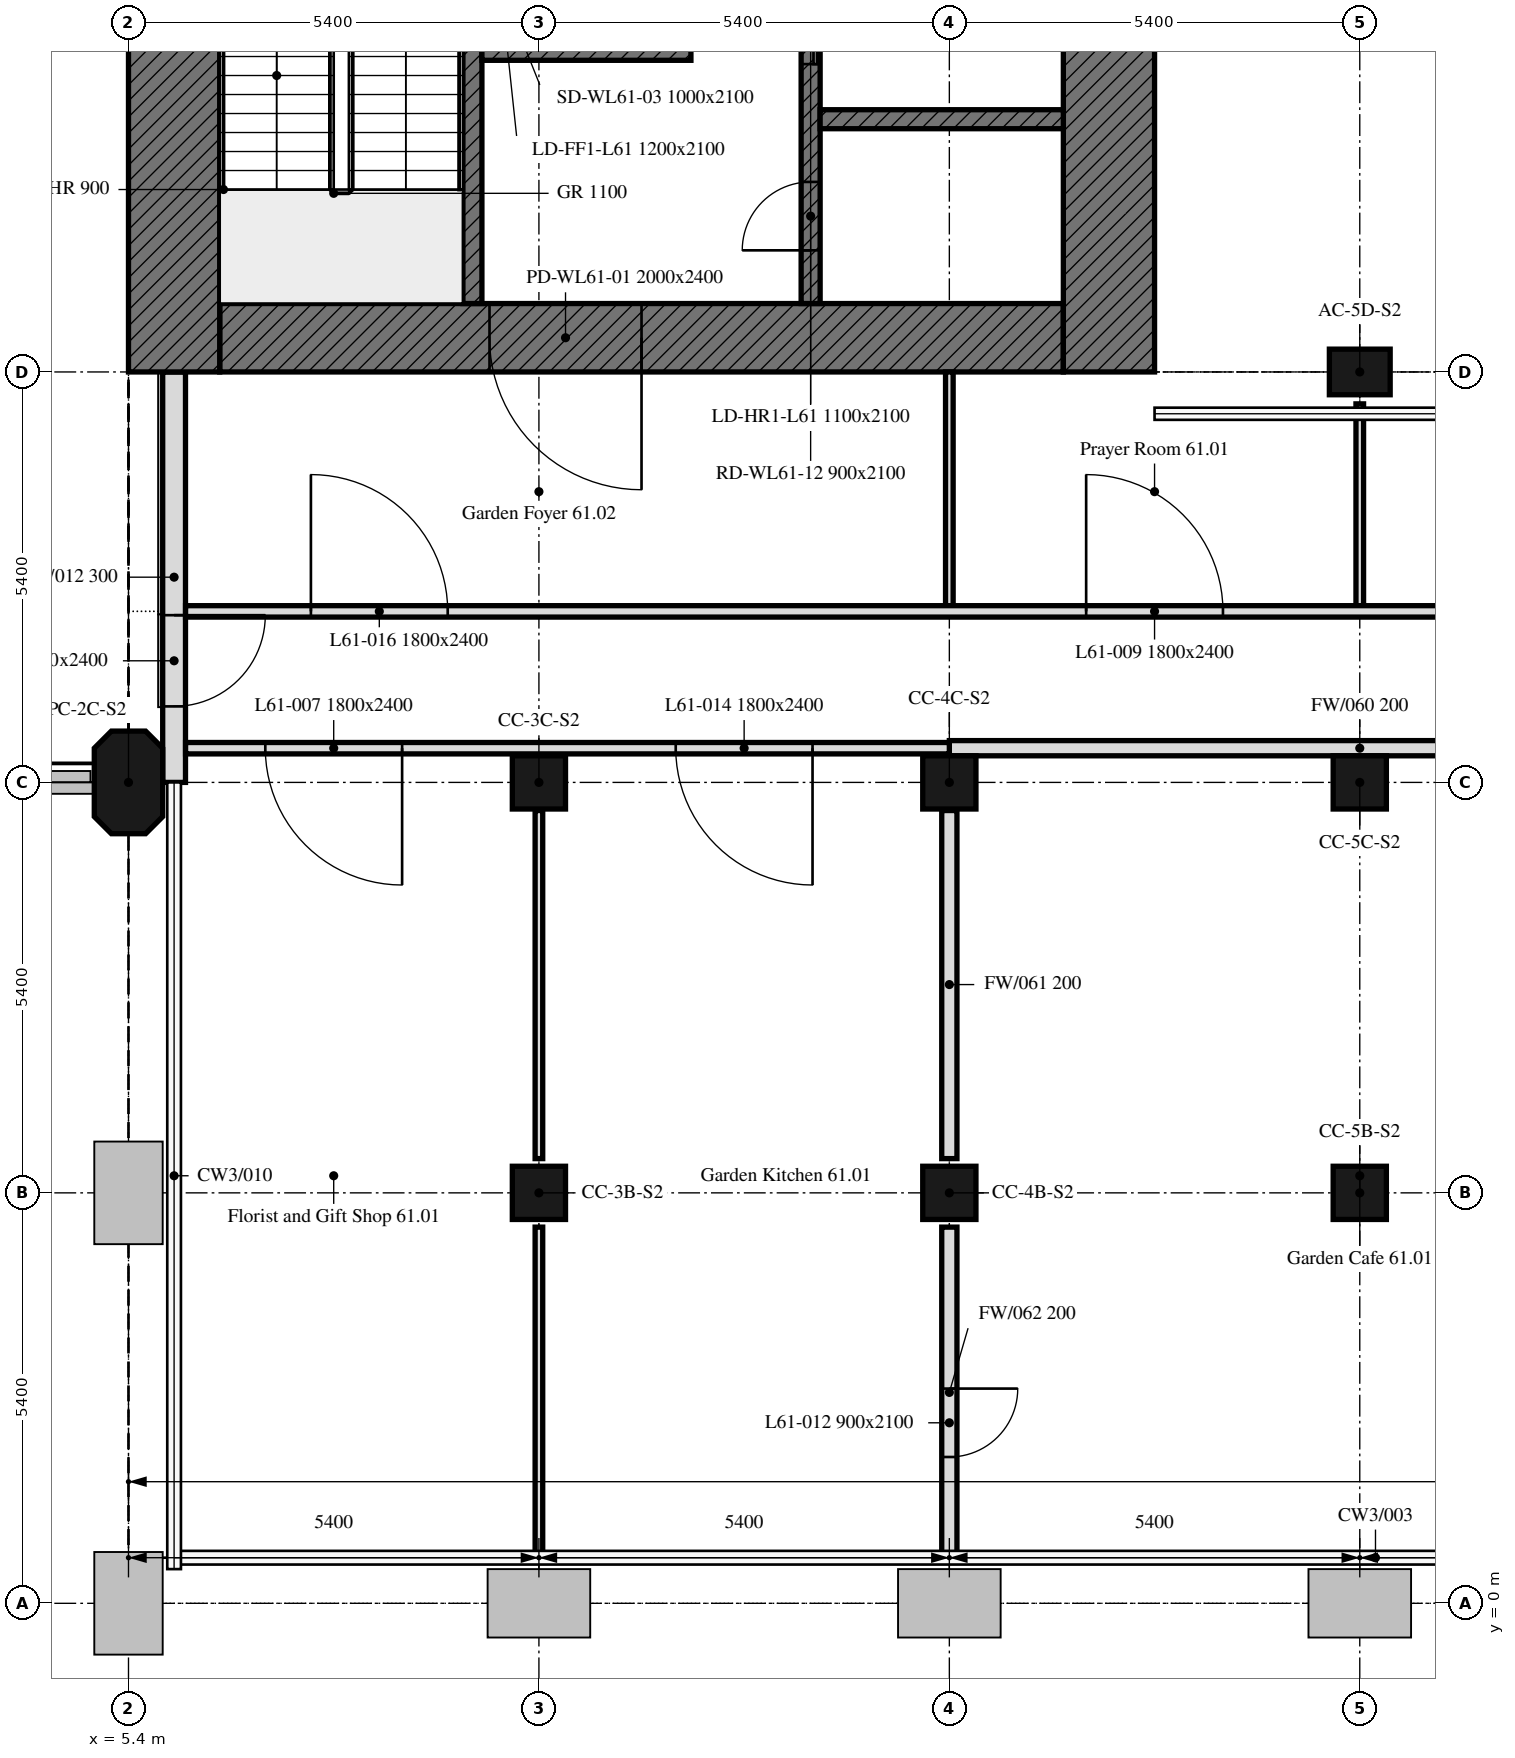
"""IFC4 building model, lengths in metres.
Left out: names, types, materials, properties, quantities, classifications, styles, units other than length and angle.
Written with IfcOpenShell. Run it as: python <this file> out.ifc"""

import sys

from ifc_helpers import new_model, si_unit, direction, frame, frame_2d, origin, origin_2d, place, context, subcontext, project, spatial, polyline, rectangle, outline, extrude, element, fill, save


model = new_model("IFC4")
c1 = context("Model", 3, precision=1e-05, world=origin(), true_north=direction((0.0, 1.0)))
c2 = subcontext(c1, "Body", "Model", "MODEL_VIEW")
j1 = project(units=[si_unit("LENGTHUNIT", "METRE"), si_unit("PLANEANGLEUNIT", "RADIAN")], contexts=[c1])
p1 = place(None, origin())
s1 = spatial("IfcSite", under=j1, at=p1, CompositionType="ELEMENT")
p2 = place(p1, origin())
s2 = spatial("IfcBuilding", under=s1, at=p2, CompositionType="ELEMENT")
p3 = place(p2, frame((0.0, 0.0, 250.9)))
s3 = spatial("IfcBuildingStorey", under=s2, at=p3, CompositionType="ELEMENT", Elevation=250.9)
for number, where, z_axis, x_axis in (
    (1, (10.8, 5.4, 0.0), (0.0, 0.0, 1.0), (1.0, 0.0, 0.0)),
    (2, (16.2, 5.4, 0.0), (0.0, 0.0, 1.0), (1.0, 0.0, 0.0)),
    (3, (21.6, 5.4, 0.0), (0.0, 0.0, 1.0), (1.0, 0.0, 0.0)),
):
    element("IfcColumn", number, at=place(p3, frame(where, z_axis=z_axis, x_axis=x_axis)), inside=s3, PredefinedType="COLUMN", context=c2, shape_type="SweptSolid", body=[
        extrude(rectangle(XDim=0.7, YDim=0.7, at=origin_2d()), origin(), (0.0, 0.0, 1.0), 4.5),
    ])
p4 = place(p3, frame((5.4, 10.8, 0.0), z_axis=(0.0, 0.0, 1.0), x_axis=(0.0, 1.0, 0.0)))
e4 = element("IfcColumn", 4, at=p4, inside=s3, PredefinedType="COLUMN", context=c2, shape_type="SweptSolid", body=[
    extrude(outline(polyline([(-0.45, -0.45), (0.45, -0.45), (0.675, -0.225), (0.675, 0.225), (0.45, 0.45), (-0.45, 0.45), (-0.675, 0.225), (-0.675, -0.225), (-0.45, -0.45)])), origin(), (0.0, 0.0, 1.0), 4.5),
])
for number, where, z_axis, x_axis in (
    (5, (10.8, 10.8, 0.0), (0.0, 0.0, 1.0), (1.0, 0.0, 0.0)),
    (6, (16.2, 10.8, 0.0), (0.0, 0.0, 1.0), (1.0, 0.0, 0.0)),
    (7, (21.6, 10.8, 0.0), (0.0, 0.0, 1.0), (1.0, 0.0, 0.0)),
):
    element("IfcColumn", number, at=place(p3, frame(where, z_axis=z_axis, x_axis=x_axis)), inside=s3, PredefinedType="COLUMN", context=c2, shape_type="SweptSolid", body=[
        extrude(rectangle(XDim=0.7, YDim=0.7, at=origin_2d()), origin(), (0.0, 0.0, 1.0), 4.5),
    ])
p5 = place(p3, frame((21.6, 16.2, 0.0), z_axis=(0.0, 0.0, 1.0), x_axis=(1.0, 0.0, 0.0)))
e8 = element("IfcColumn", 8, at=p5, inside=s3, PredefinedType="COLUMN", context=c2, shape_type="SweptSolid", body=[
    extrude(rectangle(XDim=0.8, YDim=0.6, at=origin_2d()), origin(), (0.0, 0.0, 1.0), 4.5),
])
p6 = place(p3, frame((6.0, 16.2, 0.0), z_axis=(0.0, 0.0, 1.0), x_axis=(0.0, -1.0, 0.0)))
e9 = element("IfcWall", 9, at=p6, inside=s3, PredefinedType="SOLIDWALL", context=c2, shape_type="SweptSolid", body=[
    extrude(rectangle(XDim=5.4, YDim=0.3, at=frame_2d((2.7, 0.0))), origin(), (0.0, 0.0, 1.0), 4.5),
])
p7 = place(p6, frame((3.2, 0.0, 0.0)))
e10 = element("IfcOpeningElement", 10, at=p7, cuts=e9, PredefinedType="OPENING", context=c2, shape_type="SweptSolid", body=[
    extrude(rectangle(XDim=1.2, YDim=2.4, at=frame_2d((0.6, 1.2))), frame((0.0, 0.16, 0.0), z_axis=(0.0, -1.0, 0.0), x_axis=(1.0, 0.0, 0.0)), (0.0, 0.0, 1.0), 0.32),
])
p8 = place(p3, frame((17.7, 16.65, 0.0), z_axis=(0.0, 0.0, 1.0), x_axis=(-1.0, 0.0, 0.0)))
e11 = element("IfcWall", 11, at=p8, inside=s3, PredefinedType="SOLIDWALL", context=c2, shape_type="SweptSolid", body=[
    extrude(rectangle(XDim=11.1, YDim=0.9, at=frame_2d((5.55, 0.0))), origin(), (0.0, 0.0, 1.0), 4.5),
])
p9 = place(p8, frame((5.55, 0.0, 0.0)))
e12 = element("IfcOpeningElement", 12, at=p9, cuts=e11, PredefinedType="OPENING", context=c2, shape_type="SweptSolid", body=[
    extrude(rectangle(XDim=2.0, YDim=2.4, at=frame_2d((1.0, 1.2))), frame((0.0, 0.45, 0.0), z_axis=(0.0, -1.0, 0.0), x_axis=(1.0, 0.0, 0.0)), (0.0, 0.0, 1.0), 0.9),
])
for number, where, z_axis, x_axis in (
    (13, (6.0, 16.2, 0.0), (0.0, 0.0, 1.0), (0.0, 1.0, 0.0)),
    (14, (18.3, 32.4, 0.0), (0.0, 0.0, 1.0), (0.0, -1.0, 0.0)),
):
    element("IfcWall", number, at=place(p3, frame(where, z_axis=z_axis, x_axis=x_axis)), inside=s3, PredefinedType="SOLIDWALL", context=c2, shape_type="SweptSolid", body=[
        extrude(rectangle(XDim=16.2, YDim=1.2, at=frame_2d((8.1, 0.0))), origin(), (0.0, 0.0, 1.0), 4.5),
    ])
p10 = place(p3, frame((9.925, 17.1, 0.0), z_axis=(0.0, 0.0, 1.0), x_axis=(0.0, 1.0, 0.0)))
e15 = element("IfcWall", 15, at=p10, inside=s3, PredefinedType="SOLIDWALL", context=c2, shape_type="SweptSolid", body=[
    extrude(rectangle(XDim=14.4, YDim=0.25, at=frame_2d((7.2, 0.0))), origin(), (0.0, 0.0, 1.0), 4.5),
])
p11 = place(p10, frame((4.6, 0.0, 0.0)))
e16 = element("IfcOpeningElement", 16, at=p11, cuts=e15, PredefinedType="OPENING", context=c2, shape_type="SweptSolid", body=[
    extrude(rectangle(XDim=1.0, YDim=2.1, at=frame_2d((0.5, 1.05))), frame((0.0, 0.125, 0.0), z_axis=(0.0, -1.0, 0.0), x_axis=(1.0, 0.0, 0.0)), (0.0, 0.0, 1.0), 0.25),
])
p12 = place(p10, frame((7.062, 0.0, 0.0)))
e17 = element("IfcOpeningElement", 17, at=p12, cuts=e15, PredefinedType="OPENING", context=c2, shape_type="SweptSolid", body=[
    extrude(rectangle(XDim=1.2, YDim=2.1, at=frame_2d((0.6, 1.05))), frame((0.0, 0.125, 0.0), z_axis=(0.0, -1.0, 0.0), x_axis=(1.0, 0.0, 0.0)), (0.0, 0.0, 1.0), 0.25),
])
p13 = place(p10, frame((9.726, 0.0, 0.0)))
e18 = element("IfcOpeningElement", 18, at=p13, cuts=e15, PredefinedType="OPENING", context=c2, shape_type="SweptSolid", body=[
    extrude(rectangle(XDim=0.9, YDim=2.1, at=frame_2d((0.45, 1.05))), frame((0.0, 0.125, 0.0), z_axis=(0.0, -1.0, 0.0), x_axis=(1.0, 0.0, 0.0)), (0.0, 0.0, 1.0), 0.25),
])
p14 = place(p10, frame((11.539, 0.0, 0.0)))
e19 = element("IfcOpeningElement", 19, at=p14, cuts=e15, PredefinedType="OPENING", context=c2, shape_type="SweptSolid", body=[
    extrude(rectangle(XDim=0.9, YDim=2.1, at=frame_2d((0.45, 1.05))), frame((0.0, 0.125, 0.0), z_axis=(0.0, -1.0, 0.0), x_axis=(1.0, 0.0, 0.0)), (0.0, 0.0, 1.0), 0.25),
])
p15 = place(p10, frame((13.226, 0.0, 0.0)))
e20 = element("IfcOpeningElement", 20, at=p15, cuts=e15, PredefinedType="OPENING", context=c2, shape_type="SweptSolid", body=[
    extrude(rectangle(XDim=0.9, YDim=2.1, at=frame_2d((0.45, 1.05))), frame((0.0, 0.125, 0.0), z_axis=(0.0, -1.0, 0.0), x_axis=(1.0, 0.0, 0.0)), (0.0, 0.0, 1.0), 0.25),
])
p16 = place(p3, frame((14.375, 17.1, 0.0), z_axis=(0.0, 0.0, 1.0), x_axis=(0.0, 1.0, 0.0)))
e21 = element("IfcWall", 21, at=p16, inside=s3, PredefinedType="SOLIDWALL", context=c2, shape_type="SweptSolid", body=[
    extrude(rectangle(XDim=14.4, YDim=0.25, at=frame_2d((7.2, 0.0))), origin(), (0.0, 0.0, 1.0), 4.5),
])
p17 = place(p16, frame((13.15, 0.0, 0.0)))
e22 = element("IfcOpeningElement", 22, at=p17, cuts=e21, PredefinedType="OPENING", context=c2, shape_type="SweptSolid", body=[
    extrude(rectangle(XDim=1.0, YDim=2.1, at=frame_2d((0.5, 1.05))), frame((0.0, 0.125, 0.0), z_axis=(0.0, -1.0, 0.0), x_axis=(1.0, 0.0, 0.0)), (0.0, 0.0, 1.0), 0.25),
])
p18 = place(p16, frame((3.15, 0.0, 0.0)))
e23 = element("IfcOpeningElement", 23, at=p18, cuts=e21, PredefinedType="OPENING", context=c2, shape_type="SweptSolid", body=[
    extrude(rectangle(XDim=1.1, YDim=2.1, at=frame_2d((0.55, 1.05))), frame((0.0, 0.125, 0.0), z_axis=(0.0, -1.0, 0.0), x_axis=(1.0, 0.0, 0.0)), (0.0, 0.0, 1.0), 0.25),
])
p19 = place(p16, frame((0.7, 0.0, 0.0)))
e24 = element("IfcOpeningElement", 24, at=p19, cuts=e21, PredefinedType="OPENING", context=c2, shape_type="SweptSolid", body=[
    extrude(rectangle(XDim=0.9, YDim=2.1, at=frame_2d((0.45, 1.05))), frame((0.0, 0.125, 0.0), z_axis=(0.0, -1.0, 0.0), x_axis=(1.0, 0.0, 0.0)), (0.0, 0.0, 1.0), 0.25),
])
p20 = place(p16, frame((6.175, 0.0, 0.0)))
e25 = element("IfcOpeningElement", 25, at=p20, cuts=e21, PredefinedType="OPENING", context=c2, shape_type="SweptSolid", body=[
    extrude(rectangle(XDim=0.9, YDim=2.1, at=frame_2d((0.45, 1.05))), frame((0.0, 0.125, 0.0), z_axis=(0.0, -1.0, 0.0), x_axis=(1.0, 0.0, 0.0)), (0.0, 0.0, 1.0), 0.25),
])
p21 = place(p3, frame((10.05, 20.425, 0.0), z_axis=(0.0, 0.0, 1.0), x_axis=(1.0, 0.0, 0.0)))
e26 = element("IfcWall", 26, at=p21, inside=s3, PredefinedType="SOLIDWALL", context=c2, shape_type="SweptSolid", body=[
    extrude(rectangle(XDim=2.75, YDim=0.25, at=frame_2d((1.375, 0.0))), origin(), (0.0, 0.0, 1.0), 4.5),
])
p22 = place(p3, frame((14.5, 19.525, 0.0), z_axis=(0.0, 0.0, 1.0), x_axis=(1.0, 0.0, 0.0)))
e27 = element("IfcWall", 27, at=p22, inside=s3, PredefinedType="SOLIDWALL", context=c2, shape_type="SweptSolid", body=[
    extrude(rectangle(XDim=3.2, YDim=0.25, at=frame_2d((1.6, 0.0))), origin(), (0.0, 0.0, 1.0), 4.5),
])
p23 = place(p3, frame((27.0, 11.25, 0.0), z_axis=(0.0, 0.0, 1.0), x_axis=(-1.0, 0.0, 0.0)))
e28 = element("IfcWall", 28, at=p23, inside=s3, PredefinedType="PARTITIONING", context=c2, shape_type="SweptSolid", body=[
    extrude(rectangle(XDim=10.8, YDim=0.2, at=frame_2d((5.4, 0.0))), origin(), (0.0, 0.0, 1.0), 3.75),
])
p24 = place(p23, frame((1.7, 0.0, 0.0)))
e29 = element("IfcOpeningElement", 29, at=p24, cuts=e28, PredefinedType="OPENING", context=c2, shape_type="SweptSolid", body=[
    extrude(rectangle(XDim=1.8, YDim=2.4, at=frame_2d((0.9, 1.2))), frame((0.0, 0.1, 0.0), z_axis=(0.0, -1.0, 0.0), x_axis=(1.0, 0.0, 0.0)), (0.0, 0.0, 1.0), 0.2),
])
p25 = place(p3, frame((16.2, 10.43, 0.0), z_axis=(0.0, 0.0, 1.0), x_axis=(0.0, -1.0, 0.0)))
e30 = element("IfcWall", 30, at=p25, inside=s3, PredefinedType="PARTITIONING", context=c2, shape_type="SweptSolid", body=[
    extrude(rectangle(XDim=4.579, YDim=0.2, at=frame_2d((2.29, 0.0))), origin(), (0.0, 0.0, 1.0), 3.75),
])
p26 = place(p3, frame((16.2, 4.949, 0.0), z_axis=(0.0, 0.0, 1.0), x_axis=(0.0, -1.0, 0.0)))
e31 = element("IfcWall", 31, at=p26, inside=s3, PredefinedType="PARTITIONING", context=c2, shape_type="SweptSolid", body=[
    extrude(rectangle(XDim=4.349, YDim=0.2, at=frame_2d((2.175, 0.0))), origin(), (0.0, 0.0, 1.0), 3.75),
])
p27 = place(p26, frame((2.124, 0.0, 0.0)))
e32 = element("IfcOpeningElement", 32, at=p27, cuts=e31, PredefinedType="OPENING", context=c2, shape_type="SweptSolid", body=[
    extrude(rectangle(XDim=0.9, YDim=2.1, at=frame_2d((0.45, 1.05))), frame((0.0, 0.1, 0.0), z_axis=(0.0, -1.0, 0.0), x_axis=(1.0, 0.0, 0.0)), (0.0, 0.0, 1.0), 0.2),
])
p28 = place(p3, frame((10.8, 10.43, 0.0), z_axis=(0.0, 0.0, 1.0), x_axis=(0.0, -1.0, 0.0)))
e33 = element("IfcWall", 33, at=p28, inside=s3, PredefinedType="PARTITIONING", context=c2, shape_type="SweptSolid", body=[
    extrude(rectangle(XDim=4.579, YDim=0.1, at=frame_2d((2.29, 0.0))), origin(), (0.0, 0.0, 1.0), 3.75),
])
p29 = place(p3, frame((10.8, 4.949, 0.0), z_axis=(0.0, 0.0, 1.0), x_axis=(0.0, -1.0, 0.0)))
e34 = element("IfcWall", 34, at=p29, inside=s3, PredefinedType="PARTITIONING", context=c2, shape_type="SweptSolid", body=[
    extrude(rectangle(XDim=4.349, YDim=0.1, at=frame_2d((2.175, 0.0))), origin(), (0.0, 0.0, 1.0), 3.75),
])
p30 = place(p3, frame((16.2, 11.25, 0.0), z_axis=(0.0, 0.0, 1.0), x_axis=(-1.0, 0.0, 0.0)))
e35 = element("IfcWall", 35, at=p30, inside=s3, PredefinedType="PARTITIONING", context=c2, shape_type="SweptSolid", body=[
    extrude(rectangle(XDim=10.049, YDim=0.15, at=frame_2d((5.024, 0.0))), origin(), (0.0, 0.0, 1.0), 3.75),
])
p31 = place(p30, frame((7.2, 0.0, 0.0)))
e36 = element("IfcOpeningElement", 36, at=p31, cuts=e35, PredefinedType="OPENING", context=c2, shape_type="SweptSolid", body=[
    extrude(rectangle(XDim=1.8, YDim=2.4, at=frame_2d((0.9, 1.2))), frame((0.0, 0.075, 0.0), z_axis=(0.0, -1.0, 0.0), x_axis=(1.0, 0.0, 0.0)), (0.0, 0.0, 1.0), 0.15),
])
p32 = place(p30, frame((1.8, 0.0, 0.0)))
e37 = element("IfcOpeningElement", 37, at=p32, cuts=e35, PredefinedType="OPENING", context=c2, shape_type="SweptSolid", body=[
    extrude(rectangle(XDim=1.8, YDim=2.4, at=frame_2d((0.9, 1.2))), frame((0.0, 0.075, 0.0), z_axis=(0.0, -1.0, 0.0), x_axis=(1.0, 0.0, 0.0)), (0.0, 0.0, 1.0), 0.15),
])
p33 = place(p3, frame((21.6, 15.78, 0.0), z_axis=(0.0, 0.0, 1.0), x_axis=(0.0, -1.0, 0.0)))
e38 = element("IfcWall", 38, at=p33, inside=s3, PredefinedType="PARTITIONING", context=c2, shape_type="SweptSolid", body=[
    extrude(rectangle(XDim=2.655, YDim=0.1, at=frame_2d((1.328, 0.0))), origin(), (0.0, 0.0, 1.0), 3.75),
])
p34 = place(p3, frame((16.2, 16.2, 0.0), z_axis=(0.0, 0.0, 1.0), x_axis=(0.0, -1.0, 0.0)))
e39 = element("IfcWall", 39, at=p34, inside=s3, PredefinedType="PARTITIONING", context=c2, shape_type="SweptSolid", body=[
    extrude(rectangle(XDim=3.075, YDim=0.1, at=frame_2d((1.538, 0.0))), origin(), (0.0, 0.0, 1.0), 3.75),
])
p35 = place(p3, frame((6.151, 13.05, 0.0), z_axis=(0.0, 0.0, 1.0), x_axis=(1.0, 0.0, 0.0)))
e40 = element("IfcWall", 40, at=p35, inside=s3, PredefinedType="PARTITIONING", context=c2, shape_type="SweptSolid", body=[
    extrude(rectangle(XDim=36.449, YDim=0.15, at=frame_2d((18.225, 0.0))), origin(), (0.0, 0.0, 1.0), 3.75),
])
p36 = place(p35, frame((17.849, 0.0, 0.0)))
e41 = element("IfcOpeningElement", 41, at=p36, cuts=e40, PredefinedType="OPENING", context=c2, shape_type="SweptSolid", body=[
    extrude(rectangle(XDim=1.8, YDim=2.4, at=frame_2d((0.9, 1.2))), frame((0.0, 0.075, 0.0), z_axis=(0.0, -1.0, 0.0), x_axis=(1.0, 0.0, 0.0)), (0.0, 0.0, 1.0), 0.15),
])
p37 = place(p35, frame((11.849, 0.0, 0.0)))
e42 = element("IfcOpeningElement", 42, at=p37, cuts=e40, PredefinedType="OPENING", context=c2, shape_type="SweptSolid", body=[
    extrude(rectangle(XDim=1.8, YDim=2.4, at=frame_2d((0.9, 1.2))), frame((0.0, 0.075, 0.0), z_axis=(0.0, -1.0, 0.0), x_axis=(1.0, 0.0, 0.0)), (0.0, 0.0, 1.0), 0.15),
])
p38 = place(p35, frame((28.649, 0.0, 0.0)))
e43 = element("IfcOpeningElement", 43, at=p38, cuts=e40, PredefinedType="OPENING", context=c2, shape_type="SweptSolid", body=[
    extrude(rectangle(XDim=1.8, YDim=2.4, at=frame_2d((0.9, 1.2))), frame((0.0, 0.075, 0.0), z_axis=(0.0, -1.0, 0.0), x_axis=(1.0, 0.0, 0.0)), (0.0, 0.0, 1.0), 0.15),
])
p39 = place(p35, frame((1.649, 0.0, 0.0)))
e44 = element("IfcOpeningElement", 44, at=p39, cuts=e40, PredefinedType="OPENING", context=c2, shape_type="SweptSolid", body=[
    extrude(rectangle(XDim=1.8, YDim=2.4, at=frame_2d((0.9, 1.2))), frame((0.0, 0.075, 0.0), z_axis=(0.0, -1.0, 0.0), x_axis=(1.0, 0.0, 0.0)), (0.0, 0.0, 1.0), 0.15),
])
p40 = place(p7, origin())
e45 = element("IfcDoor", 45, at=p40, inside=s3, OperationType="SINGLE_SWING_LEFT", PredefinedType="DOOR", context=c2, shape_type="SweptSolid", body=[
    extrude(rectangle(XDim=1.2, YDim=2.4, at=frame_2d((0.6, 1.2))), frame((0.0, 0.025, 0.0), z_axis=(0.0, -1.0, 0.0), x_axis=(1.0, 0.0, 0.0)), (0.0, 0.0, 1.0), 0.05),
])
fill(e10, e45)
p41 = place(p9, origin())
e46 = element("IfcDoor", 46, at=p41, inside=s3, OperationType="DOUBLE_DOOR_SINGLE_SWING", PredefinedType="DOOR", context=c2, shape_type="SweptSolid", body=[
    extrude(rectangle(XDim=2.0, YDim=2.4, at=frame_2d((1.0, 1.2))), frame((0.0, 0.025, 0.0), z_axis=(0.0, -1.0, 0.0), x_axis=(1.0, 0.0, 0.0)), (0.0, 0.0, 1.0), 0.05),
])
fill(e12, e46)
p42 = place(p18, origin())
e47 = element("IfcDoor", 47, at=p42, inside=s3, OperationType="DOUBLE_DOOR_SLIDING", PredefinedType="DOOR", context=c2, shape_type="SweptSolid", body=[
    extrude(rectangle(XDim=1.1, YDim=2.1, at=frame_2d((0.55, 1.05))), frame((0.0, 0.025, 0.0), z_axis=(0.0, -1.0, 0.0), x_axis=(1.0, 0.0, 0.0)), (0.0, 0.0, 1.0), 0.05),
])
fill(e23, e47)
p43 = place(p19, origin())
e48 = element("IfcDoor", 48, at=p43, inside=s3, OperationType="SINGLE_SWING_LEFT", PredefinedType="DOOR", context=c2, shape_type="SweptSolid", body=[
    extrude(rectangle(XDim=0.9, YDim=2.1, at=frame_2d((0.45, 1.05))), frame((0.0, 0.025, 0.0), z_axis=(0.0, -1.0, 0.0), x_axis=(1.0, 0.0, 0.0)), (0.0, 0.0, 1.0), 0.05),
])
fill(e24, e48)
p44 = place(p31, origin())
e49 = element("IfcDoor", 49, at=p44, inside=s3, OperationType="DOUBLE_DOOR_SINGLE_SWING", PredefinedType="DOOR", context=c2, shape_type="SweptSolid", body=[
    extrude(rectangle(XDim=1.8, YDim=2.4, at=frame_2d((0.9, 1.2))), frame((0.0, 0.025, 0.0), z_axis=(0.0, -1.0, 0.0), x_axis=(1.0, 0.0, 0.0)), (0.0, 0.0, 1.0), 0.05),
])
fill(e36, e49)
p45 = place(p37, origin())
e50 = element("IfcDoor", 50, at=p45, inside=s3, OperationType="DOUBLE_DOOR_SINGLE_SWING", PredefinedType="DOOR", context=c2, shape_type="SweptSolid", body=[
    extrude(rectangle(XDim=1.8, YDim=2.4, at=frame_2d((0.9, 1.2))), frame((0.0, 0.025, 0.0), z_axis=(0.0, -1.0, 0.0), x_axis=(1.0, 0.0, 0.0)), (0.0, 0.0, 1.0), 0.05),
])
fill(e42, e50)
p46 = place(p27, origin())
e51 = element("IfcDoor", 51, at=p46, inside=s3, OperationType="SINGLE_SWING_RIGHT", PredefinedType="DOOR", context=c2, shape_type="SweptSolid", body=[
    extrude(rectangle(XDim=0.9, YDim=2.1, at=frame_2d((0.45, 1.05))), frame((0.0, 0.025, 0.0), z_axis=(0.0, -1.0, 0.0), x_axis=(1.0, 0.0, 0.0)), (0.0, 0.0, 1.0), 0.05),
])
fill(e32, e51)
p47 = place(p32, origin())
e52 = element("IfcDoor", 52, at=p47, inside=s3, OperationType="DOUBLE_DOOR_SINGLE_SWING", PredefinedType="DOOR", context=c2, shape_type="SweptSolid", body=[
    extrude(rectangle(XDim=1.8, YDim=2.4, at=frame_2d((0.9, 1.2))), frame((0.0, 0.025, 0.0), z_axis=(0.0, -1.0, 0.0), x_axis=(1.0, 0.0, 0.0)), (0.0, 0.0, 1.0), 0.05),
])
fill(e37, e52)
p48 = place(p39, origin())
e53 = element("IfcDoor", 53, at=p48, inside=s3, OperationType="DOUBLE_DOOR_SINGLE_SWING", PredefinedType="DOOR", context=c2, shape_type="SweptSolid", body=[
    extrude(rectangle(XDim=1.8, YDim=2.4, at=frame_2d((0.9, 1.2))), frame((0.0, 0.025, 0.0), z_axis=(0.0, -1.0, 0.0), x_axis=(1.0, 0.0, 0.0)), (0.0, 0.0, 1.0), 0.05),
])
fill(e44, e53)
save(model, sys.argv[1])
